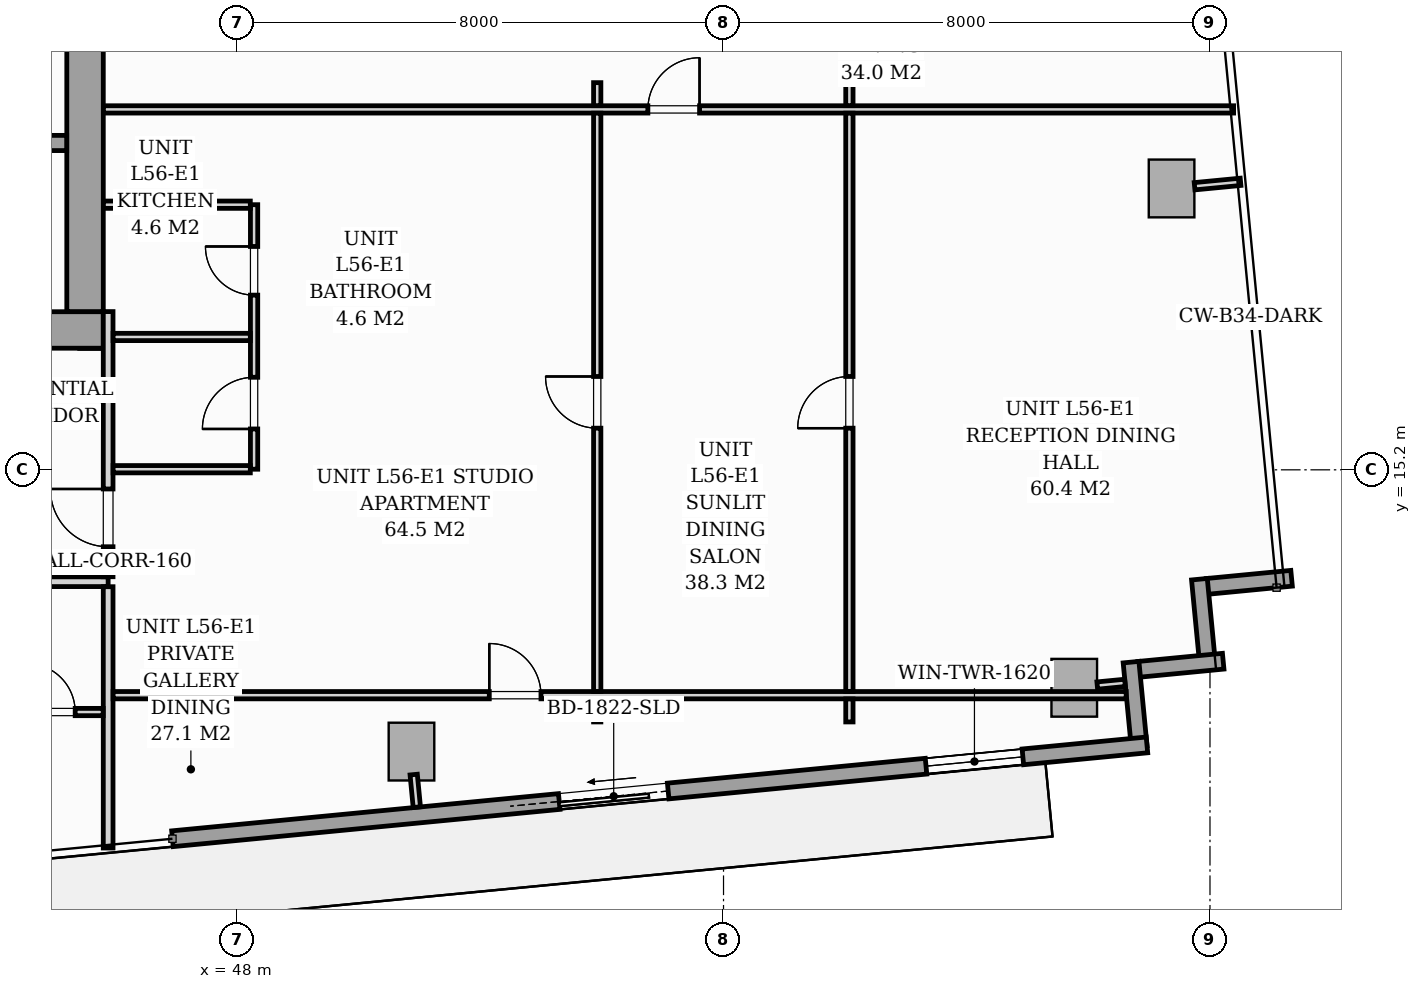
"""IFC4 building model, lengths in metres.
Left out: names, types, materials, properties, quantities, classifications, styles, units other than length and angle.
Written with IfcOpenShell. Run it as: python <this file> out.ifc"""

import sys

from ifc_helpers import new_model, si_unit, direction, frame, frame_2d, origin, origin_2d, place, context, subcontext, project, spatial, rectangle, i_section, extrude, source, transform, mapped, element, fill, save


model = new_model("IFC4")
c1 = context("Model", 3, precision=1e-05, world=origin(), true_north=direction((0.0, 1.0)))
c2 = subcontext(c1, "Body", "Model", "MODEL_VIEW")
j1 = project(units=[si_unit("LENGTHUNIT", "METRE"), si_unit("PLANEANGLEUNIT", "RADIAN")], contexts=[c1])
p1 = place(None, origin())
s1 = spatial("IfcSite", under=j1, at=p1, CompositionType="ELEMENT")
p2 = place(p1, origin())
s2 = spatial("IfcBuilding", under=s1, at=p2, CompositionType="ELEMENT")
p3 = place(p2, frame((0.0, 0.0, 195.4)))
s3 = spatial("IfcBuildingStorey", under=s2, at=p3, CompositionType="ELEMENT", Elevation=195.4)
m1 = source(origin(), c2, "Body", "SweptSolid", [
    extrude(i_section(OverallWidth=0.416, OverallDepth=0.446, WebThickness=0.039, FlangeThickness=0.063, FilletRadius=0.018, at=origin_2d()), origin(), (0.0, 0.0, 1.0), 3.196),
])
p4 = place(p3, frame((45.6, 17.4, 0.002), z_axis=(0.0, 0.0, 1.0), x_axis=(1.0, 0.0, 0.0)))
e1 = element("IfcColumn", 1, at=p4, inside=s3, PredefinedType="PILASTER", context=c2, shape_type="MappedRepresentation", body=[
    mapped(m1, transform((0.0, 0.0, 0.0), scale=1.0)),
])
m2 = source(origin(), c2, "Body", "SweptSolid", [
    extrude(rectangle(XDim=0.75, YDim=0.95, at=origin_2d()), origin(), (0.0, 0.0, 1.0), 3.196),
])
for number, where, z_axis, x_axis in (
    (2, (50.868, 10.566, 0.002), (0.0, 0.0, 1.0), (0.995, 0.096, 0.0)),
    (3, (61.768, 11.616, 0.002), (0.0, 0.0, 1.0), (0.995, 0.096, 0.0)),
    (4, (63.368, 19.827, 0.002), (0.0, 0.0, 1.0), (0.995, 0.096, 0.0)),
):
    element("IfcColumn", number, at=place(p3, frame(where, z_axis=z_axis, x_axis=x_axis)), inside=s3, PredefinedType="COLUMN", context=c2, shape_type="MappedRepresentation", body=[
        mapped(m2, transform((0.0, 0.0, 0.0), scale=1.0)),
    ])
p5 = place(p3, frame((65.342, 13.417, 0.0), z_axis=(0.0, 0.0, 1.0), x_axis=(-0.99540774648, -0.095725744959, 0.0)))
e5 = element("IfcWall", 5, at=p5, inside=s3, PredefinedType="STANDARD", context=c2, shape_type="SweptSolid", body=[
    extrude(rectangle(XDim=1.395, YDim=0.26, at=frame_2d((0.698, 0.0))), origin(), (0.0, 0.0, 1.0), 2.94),
])
p6 = place(p3, frame((63.826, 13.401, 0.0), z_axis=(0.0, 0.0, 1.0), x_axis=(0.095915846097, -0.995389446633, 0.0)))
e6 = element("IfcWall", 6, at=p6, inside=s3, PredefinedType="STANDARD", context=c2, shape_type="SweptSolid", body=[
    extrude(rectangle(XDim=1.395, YDim=0.26, at=frame_2d((0.697, 0.0))), origin(), (0.0, 0.0, 1.0), 2.94),
])
for number, where, z_axis, x_axis in (
    (7, (64.217, 12.053, 0.0), (0.0, 0.0, 1.0), (-0.995, -0.096, 0.0)),
    (8, (62.702, 12.037, 0.0), (0.0, 0.0, 1.0), (0.096, -0.995, 0.0)),
):
    element("IfcWall", number, at=place(p3, frame(where, z_axis=z_axis, x_axis=x_axis)), inside=s3, PredefinedType="STANDARD", context=c2, shape_type="SweptSolid", body=[
        extrude(rectangle(XDim=1.395, YDim=0.26, at=frame_2d((0.698, 0.0))), origin(), (0.0, 0.0, 1.0), 2.94),
    ])
p7 = place(p3, frame((62.963, 10.676, 0.0), z_axis=(0.0, 0.0, 1.0), x_axis=(-0.995395627913, -0.095851676732, 0.0)))
e9 = element("IfcWall", 9, at=p7, inside=s3, PredefinedType="STANDARD", context=c2, shape_type="SweptSolid", body=[
    extrude(rectangle(XDim=16.1, YDim=0.26, at=frame_2d((8.05, 0.0))), origin(), (0.0, 0.0, 1.0), 2.94),
])
p8 = place(p7, frame((7.91, 0.0, 0.0)))
e10 = element("IfcOpeningElement", 10, at=p8, cuts=e9, PredefinedType="OPENING", context=c2, shape_type="SweptSolid", body=[
    extrude(rectangle(XDim=1.8, YDim=2.06, at=frame_2d((0.9, 1.03))), frame((0.0, 0.14, 0.0), z_axis=(0.0, -1.0, 0.0), x_axis=(1.0, 0.0, 0.0)), (0.0, 0.0, 1.0), 0.28),
])
p9 = place(p7, frame((2.05, 0.0, 0.65)))
e11 = element("IfcOpeningElement", 11, at=p9, cuts=e9, PredefinedType="OPENING", context=c2, shape_type="SweptSolid", body=[
    extrude(rectangle(XDim=1.6, YDim=1.5, at=frame_2d((0.8, 0.75))), frame((0.0, 0.14, 0.0), z_axis=(0.0, -1.0, 0.0), x_axis=(1.0, 0.0, 0.0)), (0.0, 0.0, 1.0), 0.28),
])
p10 = place(p3, frame((26.2, 17.5, 0.0), z_axis=(0.0, 0.0, 1.0), x_axis=(1.0, 0.0, 0.0)))
e12 = element("IfcWall", 12, at=p10, inside=s3, PredefinedType="SHEAR", context=c2, shape_type="SweptSolid", body=[
    extrude(rectangle(XDim=19.6, YDim=0.6, at=frame_2d((9.8, 0.0))), origin(), (0.0, 0.0, 1.0), 3.2),
])
p11 = place(p10, frame((0.95, 0.0, 0.0)))
e13 = element("IfcOpeningElement", 13, at=p11, cuts=e12, PredefinedType="OPENING", context=c2, shape_type="SweptSolid", body=[
    extrude(rectangle(XDim=0.95, YDim=2.06, at=frame_2d((0.475, 1.03))), frame((0.0, 0.31, 0.0), z_axis=(0.0, -1.0, 0.0), x_axis=(1.0, 0.0, 0.0)), (0.0, 0.0, 1.0), 0.62),
])
p12 = place(p10, frame((9.38, 0.0, 0.0)))
e14 = element("IfcOpeningElement", 14, at=p12, cuts=e12, PredefinedType="OPENING", context=c2, shape_type="SweptSolid", body=[
    extrude(rectangle(XDim=0.85, YDim=2.0, at=frame_2d((0.425, 1.0))), frame((0.0, 0.31, 0.0), z_axis=(0.0, -1.0, 0.0), x_axis=(1.0, 0.0, 0.0)), (0.0, 0.0, 1.0), 0.62),
])
p13 = place(p10, frame((17.55, 0.0, 0.0)))
e15 = element("IfcOpeningElement", 15, at=p13, cuts=e12, PredefinedType="OPENING", context=c2, shape_type="SweptSolid", body=[
    extrude(rectangle(XDim=0.95, YDim=2.06, at=frame_2d((0.475, 1.03))), frame((0.0, 0.31, 0.0), z_axis=(0.0, -1.0, 0.0), x_axis=(1.0, 0.0, 0.0)), (0.0, 0.0, 1.0), 0.62),
])
p14 = place(p3, frame((45.5, 17.802, 0.0), z_axis=(0.0, 0.0, 1.0), x_axis=(0.0, 1.0, 0.0)))
e16 = element("IfcWall", 16, at=p14, inside=s3, PredefinedType="SHEAR", context=c2, shape_type="SweptSolid", body=[
    extrude(rectangle(XDim=5.796, YDim=0.6, at=frame_2d((2.898, 0.0))), origin(), (0.0, 0.0, 1.0), 3.2),
])
p15 = place(p3, frame((37.05, 20.575, 0.0), z_axis=(0.0, 0.0, 1.0), x_axis=(1.0, 0.0, 0.0)))
e17 = element("IfcWall", 17, at=p15, inside=s3, PredefinedType="SOLIDWALL", context=c2, shape_type="SweptSolid", body=[
    extrude(rectangle(XDim=8.148, YDim=0.25, at=frame_2d((4.074, 0.0))), origin(), (0.0, 0.0, 1.0), 3.2),
])
p16 = place(p15, frame((6.6, 0.0, 0.0)))
e18 = element("IfcOpeningElement", 18, at=p16, cuts=e17, PredefinedType="OPENING", context=c2, shape_type="SweptSolid", body=[
    extrude(rectangle(XDim=0.95, YDim=2.06, at=frame_2d((0.475, 1.03))), frame((0.0, 0.135, 0.0), z_axis=(0.0, -1.0, 0.0), x_axis=(1.0, 0.0, 0.0)), (0.0, 0.0, 1.0), 0.27),
])
p17 = place(p3, frame((26.12, 13.36, 0.0), z_axis=(0.0, 0.0, 1.0), x_axis=(1.0, 0.0, 0.0)))
e19 = element("IfcWall", 19, at=p17, inside=s3, PredefinedType="PARTITIONING", context=c2, shape_type="SweptSolid", body=[
    extrude(rectangle(XDim=19.76, YDim=0.16, at=frame_2d((9.88, 0.0))), origin(), (0.0, 0.0, 1.0), 2.94),
])
p18 = place(p17, frame((5.221, 0.0, 0.0)))
e20 = element("IfcOpeningElement", 20, at=p18, cuts=e19, PredefinedType="OPENING", context=c2, shape_type="SweptSolid", body=[
    extrude(rectangle(XDim=0.95, YDim=2.06, at=frame_2d((0.475, 1.03))), frame((0.0, 0.09, 0.0), z_axis=(0.0, -1.0, 0.0), x_axis=(1.0, 0.0, 0.0)), (0.0, 0.0, 1.0), 0.18),
])
p19 = place(p17, frame((12.119, 0.0, 0.0)))
e21 = element("IfcOpeningElement", 21, at=p19, cuts=e19, PredefinedType="OPENING", context=c2, shape_type="SweptSolid", body=[
    extrude(rectangle(XDim=0.95, YDim=2.06, at=frame_2d((0.475, 1.03))), frame((0.0, 0.09, 0.0), z_axis=(0.0, -1.0, 0.0), x_axis=(1.0, 0.0, 0.0)), (0.0, 0.0, 1.0), 0.18),
])
p20 = place(p17, frame((14.492, 0.0, 0.0)))
e22 = element("IfcOpeningElement", 22, at=p20, cuts=e19, PredefinedType="OPENING", context=c2, shape_type="SweptSolid", body=[
    extrude(rectangle(XDim=0.95, YDim=2.06, at=frame_2d((0.475, 1.03))), frame((0.0, 0.09, 0.0), z_axis=(0.0, -1.0, 0.0), x_axis=(1.0, 0.0, 0.0)), (0.0, 0.0, 1.0), 0.18),
])
p21 = place(p3, frame((45.88, 8.981, 0.0), z_axis=(0.0, 0.0, 1.0), x_axis=(0.0, 1.0, 0.0)))
e23 = element("IfcWall", 23, at=p21, inside=s3, PredefinedType="PARTITIONING", context=c2, shape_type="SweptSolid", body=[
    extrude(rectangle(XDim=4.297, YDim=0.16, at=frame_2d((2.148, 0.0))), origin(), (0.0, 0.0, 1.0), 2.94),
])
p22 = place(p3, frame((45.88, 13.442, 0.0), z_axis=(0.0, 0.0, 1.0), x_axis=(0.0, 1.0, 0.0)))
e24 = element("IfcWall", 24, at=p22, inside=s3, PredefinedType="PARTITIONING", context=c2, shape_type="SweptSolid", body=[
    extrude(rectangle(XDim=4.36, YDim=0.16, at=frame_2d((2.18, 0.0))), origin(), (0.0, 0.0, 1.0), 2.94),
])
p23 = place(p22, frame((0.493, 0.0, 0.0)))
e25 = element("IfcOpeningElement", 25, at=p23, cuts=e24, PredefinedType="OPENING", context=c2, shape_type="SweptSolid", body=[
    extrude(rectangle(XDim=0.95, YDim=2.06, at=frame_2d((0.475, 1.03))), frame((0.0, 0.09, 0.0), z_axis=(0.0, -1.0, 0.0), x_axis=(1.0, 0.0, 0.0)), (0.0, 0.0, 1.0), 0.18),
])
p24 = place(p3, frame((42.122, 11.217, 0.0), z_axis=(0.0, 0.0, 1.0), x_axis=(1.0, 0.0, 0.0)))
e26 = element("IfcWall", 26, at=p24, inside=s3, PredefinedType="PARTITIONING", context=c2, shape_type="SweptSolid", body=[
    extrude(rectangle(XDim=3.676, YDim=0.12, at=frame_2d((1.838, 0.0))), origin(), (0.0, 0.0, 1.0), 2.94),
])
p25 = place(p24, frame((0.552, 0.0, 0.0)))
e27 = element("IfcOpeningElement", 27, at=p25, cuts=e26, PredefinedType="OPENING", context=c2, shape_type="SweptSolid", body=[
    extrude(rectangle(XDim=0.85, YDim=2.05, at=frame_2d((0.425, 1.025))), frame((0.0, 0.07, 0.0), z_axis=(0.0, -1.0, 0.0), x_axis=(1.0, 0.0, 0.0)), (0.0, 0.0, 1.0), 0.14),
])
p26 = place(p24, frame((2.416, 0.0, 0.0)))
e28 = element("IfcOpeningElement", 28, at=p26, cuts=e26, PredefinedType="OPENING", context=c2, shape_type="SweptSolid", body=[
    extrude(rectangle(XDim=0.8, YDim=2.02, at=frame_2d((0.4, 1.01))), frame((0.0, 0.07, 0.0), z_axis=(0.0, -1.0, 0.0), x_axis=(1.0, 0.0, 0.0)), (0.0, 0.0, 1.0), 0.14),
])
p27 = place(p3, frame((48.28, 15.21, 0.0), z_axis=(0.0, 0.0, 1.0), x_axis=(0.0, 1.0, 0.0)))
e29 = element("IfcWall", 29, at=p27, inside=s3, PredefinedType="PARTITIONING", context=c2, shape_type="SweptSolid", body=[
    extrude(rectangle(XDim=4.35, YDim=0.12, at=frame_2d((2.175, 0.0))), origin(), (0.0, 0.0, 1.0), 2.94),
])
p28 = place(p27, frame((0.662, 0.0, 0.0)))
e30 = element("IfcOpeningElement", 30, at=p28, cuts=e29, PredefinedType="OPENING", context=c2, shape_type="SweptSolid", body=[
    extrude(rectangle(XDim=0.85, YDim=2.05, at=frame_2d((0.425, 1.025))), frame((0.0, 0.07, 0.0), z_axis=(0.0, -1.0, 0.0), x_axis=(1.0, 0.0, 0.0)), (0.0, 0.0, 1.0), 0.14),
])
p29 = place(p27, frame((2.863, 0.0, 0.0)))
e31 = element("IfcOpeningElement", 31, at=p29, cuts=e29, PredefinedType="OPENING", context=c2, shape_type="SweptSolid", body=[
    extrude(rectangle(XDim=0.8, YDim=2.02, at=frame_2d((0.4, 1.01))), frame((0.0, 0.07, 0.0), z_axis=(0.0, -1.0, 0.0), x_axis=(1.0, 0.0, 0.0)), (0.0, 0.0, 1.0), 0.14),
])
p30 = place(p3, frame((45.962, 17.385, 0.0), z_axis=(0.0, 0.0, 1.0), x_axis=(1.0, 0.0, 0.0)))
e32 = element("IfcWall", 32, at=p30, inside=s3, PredefinedType="PARTITIONING", context=c2, shape_type="SweptSolid", body=[
    extrude(rectangle(XDim=2.256, YDim=0.12, at=frame_2d((1.128, 0.0))), origin(), (0.0, 0.0, 1.0), 2.281),
])
p31 = place(p3, frame((45.962, 15.21, 0.0), z_axis=(0.0, 0.0, 1.0), x_axis=(1.0, 0.0, 0.0)))
e33 = element("IfcWall", 33, at=p31, inside=s3, PredefinedType="PARTITIONING", context=c2, shape_type="SweptSolid", body=[
    extrude(rectangle(XDim=2.256, YDim=0.12, at=frame_2d((1.128, 0.0))), origin(), (0.0, 0.0, 1.0), 2.94),
])
p32 = place(p3, frame((45.802, 19.56, 0.0), z_axis=(0.0, 0.0, 1.0), x_axis=(1.0, 0.0, 0.0)))
e34 = element("IfcWall", 34, at=p32, inside=s3, PredefinedType="PARTITIONING", context=c2, shape_type="SweptSolid", body=[
    extrude(rectangle(XDim=2.416, YDim=0.12, at=frame_2d((1.208, 0.0))), origin(), (0.0, 0.0, 1.0), 2.94),
])
p33 = place(p3, frame((45.962, 11.494, 0.0), z_axis=(0.0, 0.0, 1.0), x_axis=(1.0, 0.0, 0.0)))
e35 = element("IfcWall", 35, at=p33, inside=s3, PredefinedType="PARTITIONING", context=c2, shape_type="SweptSolid", body=[
    extrude(rectangle(XDim=16.66, YDim=0.12, at=frame_2d((8.33, 0.0))), origin(), (0.0, 0.0, 1.0), 2.383),
])
p34 = place(p33, frame((6.186, 0.0, 0.0)))
e36 = element("IfcOpeningElement", 36, at=p34, cuts=e35, PredefinedType="OPENING", context=c2, shape_type="SweptSolid", body=[
    extrude(rectangle(XDim=0.85, YDim=2.05, at=frame_2d((0.425, 1.025))), frame((0.0, 0.07, 0.0), z_axis=(0.0, -1.0, 0.0), x_axis=(1.0, 0.0, 0.0)), (0.0, 0.0, 1.0), 0.14),
])
p35 = place(p3, frame((45.802, 21.127, 0.0), z_axis=(0.0, 0.0, 1.0), x_axis=(1.0, 0.0, 0.0)))
e37 = element("IfcWall", 37, at=p35, inside=s3, PredefinedType="PARTITIONING", context=c2, shape_type="SweptSolid", body=[
    extrude(rectangle(XDim=18.586, YDim=0.12, at=frame_2d((9.293, 0.0))), origin(), (0.0, 0.0, 1.0), 2.94),
])
p36 = place(p35, frame((8.954, 0.0, 0.0)))
e38 = element("IfcOpeningElement", 38, at=p36, cuts=e37, PredefinedType="OPENING", context=c2, shape_type="SweptSolid", body=[
    extrude(rectangle(XDim=0.85, YDim=2.05, at=frame_2d((0.425, 1.025))), frame((0.0, 0.07, 0.0), z_axis=(0.0, -1.0, 0.0), x_axis=(1.0, 0.0, 0.0)), (0.0, 0.0, 1.0), 0.14),
])
p37 = place(p3, frame((58.07, 11.054, 0.0), z_axis=(0.0, 0.0, 1.0), x_axis=(0.0, 1.0, 0.0)))
e39 = element("IfcWall", 39, at=p37, inside=s3, PredefinedType="PARTITIONING", context=c2, shape_type="SweptSolid", body=[
    extrude(rectangle(XDim=0.378, YDim=0.12, at=frame_2d((0.189, 0.0))), origin(), (0.0, 0.0, 1.0), 2.94),
])
p38 = place(p3, frame((58.07, 11.556, 0.0), z_axis=(0.0, 0.0, 1.0), x_axis=(0.0, 1.0, 0.0)))
e40 = element("IfcWall", 40, at=p38, inside=s3, PredefinedType="PARTITIONING", context=c2, shape_type="SweptSolid", body=[
    extrude(rectangle(XDim=9.509, YDim=0.12, at=frame_2d((4.754, 0.0))), origin(), (0.0, 0.0, 1.0), 2.94),
])
p39 = place(p38, frame((4.329, 0.0, 0.0)))
e41 = element("IfcOpeningElement", 41, at=p39, cuts=e40, PredefinedType="OPENING", context=c2, shape_type="SweptSolid", body=[
    extrude(rectangle(XDim=0.85, YDim=2.05, at=frame_2d((0.425, 1.025))), frame((0.0, 0.07, 0.0), z_axis=(0.0, -1.0, 0.0), x_axis=(1.0, 0.0, 0.0)), (0.0, 0.0, 1.0), 0.14),
])
for number, where, z_axis, x_axis in (
    (42, (58.07, 21.189, 0.0), (0.0, 0.0, 1.0), (0.0, 1.0, 0.0)),
    (43, (53.923, 11.054, 0.0), (0.0, 0.0, 1.0), (0.0, 1.0, 0.0)),
):
    element("IfcWall", number, at=place(p3, frame(where, z_axis=z_axis, x_axis=x_axis)), inside=s3, PredefinedType="PARTITIONING", context=c2, shape_type="SweptSolid", body=[
        extrude(rectangle(XDim=0.378, YDim=0.12, at=frame_2d((0.189, 0.0))), origin(), (0.0, 0.0, 1.0), 2.94),
    ])
p40 = place(p3, frame((53.923, 11.556, 0.0), z_axis=(0.0, 0.0, 1.0), x_axis=(0.0, 1.0, 0.0)))
e44 = element("IfcWall", 44, at=p40, inside=s3, PredefinedType="PARTITIONING", context=c2, shape_type="SweptSolid", body=[
    extrude(rectangle(XDim=9.509, YDim=0.12, at=frame_2d((4.754, 0.0))), origin(), (0.0, 0.0, 1.0), 2.94),
])
p41 = place(p40, frame((4.329, 0.0, 0.0)))
e45 = element("IfcOpeningElement", 45, at=p41, cuts=e44, PredefinedType="OPENING", context=c2, shape_type="SweptSolid", body=[
    extrude(rectangle(XDim=0.85, YDim=2.05, at=frame_2d((0.425, 1.025))), frame((0.0, 0.07, 0.0), z_axis=(0.0, -1.0, 0.0), x_axis=(1.0, 0.0, 0.0)), (0.0, 0.0, 1.0), 0.14),
])
p42 = place(p3, frame((53.923, 21.189, 0.0), z_axis=(0.0, 0.0, 1.0), x_axis=(0.0, 1.0, 0.0)))
e46 = element("IfcWall", 46, at=p42, inside=s3, PredefinedType="PARTITIONING", context=c2, shape_type="SweptSolid", body=[
    extrude(rectangle(XDim=0.378, YDim=0.12, at=frame_2d((0.189, 0.0))), origin(), (0.0, 0.0, 1.0), 2.94),
])
p43 = place(p3, frame((50.905, 10.188, 0.0), z_axis=(0.0, 0.0, 1.0), x_axis=(0.095772948675, -0.995403205893, 0.0)))
e47 = element("IfcWall", 47, at=p43, inside=s3, PredefinedType="PARTITIONING", context=c2, shape_type="SweptSolid", body=[
    extrude(rectangle(XDim=0.538, YDim=0.12, at=frame_2d((0.269, 0.0))), origin(), (0.0, 0.0, 1.0), 2.94),
])
p44 = place(p3, frame((62.146, 11.652, 0.0), z_axis=(0.0, 0.0, 1.0), x_axis=(0.995384576284, 0.09596637586, 0.0)))
e48 = element("IfcWall", 48, at=p44, inside=s3, PredefinedType="PARTITIONING", context=c2, shape_type="SweptSolid", body=[
    extrude(rectangle(XDim=0.458, YDim=0.12, at=frame_2d((0.229, 0.0))), origin(), (0.0, 0.0, 1.0), 2.94),
])
p45 = place(p3, frame((63.747, 19.864, 0.0), z_axis=(0.0, 0.0, 1.0), x_axis=(0.995405496295, 0.095749140702, 0.0)))
e49 = element("IfcWall", 49, at=p45, inside=s3, PredefinedType="PARTITIONING", context=c2, shape_type="SweptSolid", body=[
    extrude(rectangle(XDim=0.76, YDim=0.12, at=frame_2d((0.38, 0.0))), origin(), (0.0, 0.0, 1.0), 2.94),
])
m3 = source(origin(), c2, "Body", "SweptSolid", [
    extrude(rectangle(XDim=1.8, YDim=2.06, at=frame_2d((0.9, 1.03))), frame((0.0, 0.025, 0.0), z_axis=(0.0, -1.0, 0.0), x_axis=(1.0, 0.0, 0.0)), (0.0, 0.0, 1.0), 0.05),
])
p46 = place(p8, origin())
e50 = element("IfcDoor", 50, at=p46, inside=s3, OperationType="SLIDING_TO_RIGHT", PredefinedType="DOOR", context=c2, shape_type="MappedRepresentation", body=[
    mapped(m3, transform((0.0, 0.0, 0.0), scale=1.0)),
])
fill(e10, e50)
m4 = source(origin(), c2, "Body", "SweptSolid", [
    extrude(rectangle(XDim=1.6, YDim=1.5, at=frame_2d((0.8, 0.75))), frame((0.0, 0.03, 0.0), z_axis=(0.0, -1.0, 0.0), x_axis=(1.0, 0.0, 0.0)), (0.0, 0.0, 1.0), 0.06),
])
p47 = place(p9, origin())
e51 = element("IfcWindow", 51, at=p47, inside=s3, PartitioningType="SINGLE_PANEL", PredefinedType="WINDOW", context=c2, shape_type="MappedRepresentation", body=[
    mapped(m4, transform((0.0, 0.0, 0.0), scale=1.0)),
])
fill(e11, e51)
m5 = source(origin(), c2, "Body", "SweptSolid", [
    extrude(rectangle(XDim=0.8, YDim=2.02, at=frame_2d((0.4, 1.01))), frame((0.0, 0.025, 0.0), z_axis=(0.0, -1.0, 0.0), x_axis=(1.0, 0.0, 0.0)), (0.0, 0.0, 1.0), 0.05),
])
p48 = place(p26, origin())
e52 = element("IfcDoor", 52, at=p48, inside=s3, OperationType="SINGLE_SWING_LEFT", PredefinedType="DOOR", context=c2, shape_type="MappedRepresentation", body=[
    mapped(m5, transform((0.0, 0.0, 0.0), scale=1.0)),
])
fill(e28, e52)
m6 = source(origin(), c2, "Body", "SweptSolid", [
    extrude(rectangle(XDim=0.95, YDim=2.06, at=frame_2d((0.475, 1.03))), frame((0.0, 0.025, 0.0), z_axis=(0.0, -1.0, 0.0), x_axis=(1.0, 0.0, 0.0)), (0.0, 0.0, 1.0), 0.05),
])
p49 = place(p23, origin())
e53 = element("IfcDoor", 53, at=p49, inside=s3, OperationType="SINGLE_SWING_RIGHT", PredefinedType="DOOR", context=c2, shape_type="MappedRepresentation", body=[
    mapped(m6, transform((0.0, 0.0, 0.0), scale=1.0)),
])
fill(e25, e53)
m7 = source(origin(), c2, "Body", "SweptSolid", [
    extrude(rectangle(XDim=0.85, YDim=2.05, at=frame_2d((0.425, 1.025))), frame((0.0, 0.025, 0.0), z_axis=(0.0, -1.0, 0.0), x_axis=(1.0, 0.0, 0.0)), (0.0, 0.0, 1.0), 0.05),
])
p50 = place(p28, origin())
e54 = element("IfcDoor", 54, at=p50, inside=s3, OperationType="SINGLE_SWING_LEFT", PredefinedType="DOOR", context=c2, shape_type="MappedRepresentation", body=[
    mapped(m7, transform((0.0, 0.0, 0.0), scale=1.0)),
])
fill(e30, e54)
p51 = place(p29, origin())
e55 = element("IfcDoor", 55, at=p51, inside=s3, OperationType="SINGLE_SWING_RIGHT", PredefinedType="DOOR", context=c2, shape_type="MappedRepresentation", body=[
    mapped(m5, transform((0.0, 0.0, 0.0), scale=1.0)),
])
fill(e31, e55)
p52 = place(p34, origin())
e56 = element("IfcDoor", 56, at=p52, inside=s3, OperationType="SINGLE_SWING_LEFT", PredefinedType="DOOR", context=c2, shape_type="MappedRepresentation", body=[
    mapped(m7, transform((0.0, 0.0, 0.0), scale=1.0)),
])
fill(e36, e56)
p53 = place(p36, origin())
e57 = element("IfcDoor", 57, at=p53, inside=s3, OperationType="SINGLE_SWING_RIGHT", PredefinedType="DOOR", context=c2, shape_type="MappedRepresentation", body=[
    mapped(m7, transform((0.0, 0.0, 0.0), scale=1.0)),
])
fill(e38, e57)
p54 = place(p39, origin())
e58 = element("IfcDoor", 58, at=p54, inside=s3, OperationType="SINGLE_SWING_LEFT", PredefinedType="DOOR", context=c2, shape_type="MappedRepresentation", body=[
    mapped(m7, transform((0.0, 0.0, 0.0), scale=1.0)),
])
fill(e41, e58)
p55 = place(p41, origin())
e59 = element("IfcDoor", 59, at=p55, inside=s3, OperationType="SINGLE_SWING_RIGHT", PredefinedType="DOOR", context=c2, shape_type="MappedRepresentation", body=[
    mapped(m7, transform((0.0, 0.0, 0.0), scale=1.0)),
])
fill(e45, e59)
save(model, sys.argv[1])
